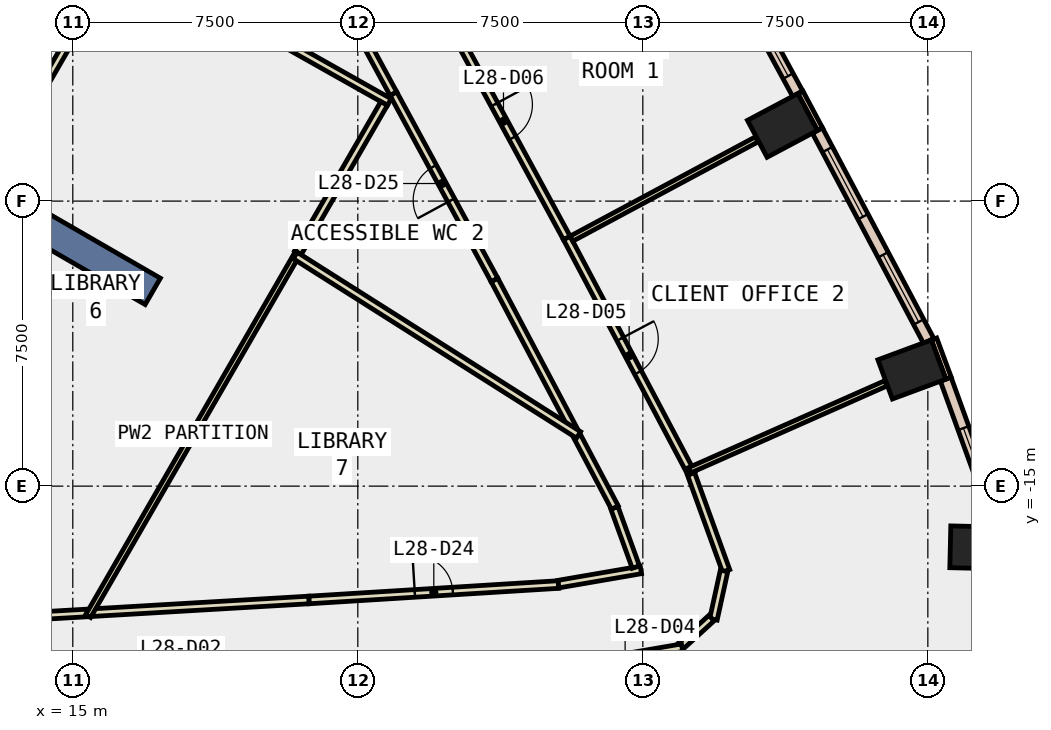
"""IFC4 building model, lengths in metres.
Left out: names, types, materials, properties, quantities, classifications, styles, units other than length and angle.
Written with IfcOpenShell. Run it as: python <this file> out.ifc"""

import sys

from ifc_helpers import new_model, si_unit, direction, frame, frame_2d, origin, origin_2d, place, context, subcontext, project, spatial, rectangle, extrude, element, fill, save


model = new_model("IFC4")
c1 = context("Model", 3, precision=1e-05, world=origin(), true_north=direction((0.0, 1.0)))
c2 = subcontext(c1, "Body", "Model", "MODEL_VIEW")
j1 = project(units=[si_unit("LENGTHUNIT", "METRE"), si_unit("PLANEANGLEUNIT", "RADIAN")], contexts=[c1])
p1 = place(None, origin())
s1 = spatial("IfcSite", under=j1, at=p1, CompositionType="ELEMENT")
p2 = place(p1, origin())
s2 = spatial("IfcBuilding", under=s1, at=p2, CompositionType="ELEMENT")
p3 = place(p2, frame((0.0, 0.0, 128.6)))
s3 = spatial("IfcBuildingStorey", under=s2, at=p3, CompositionType="ELEMENT", Elevation=128.6)
for number, where, z_axis, x_axis in (
    (1, (38.841, -16.614, -0.4), (0.0, 0.0, 1.0), (0.023, 1.0, 0.0)),
    (2, (37.08, -11.931, -0.4), (0.0, 0.0, 1.0), (-0.347, 0.938, 0.0)),
    (3, (33.674, -5.509, -0.4), (0.0, 0.0, 1.0), (-0.469, 0.883, 0.0)),
):
    element("IfcColumn", number, at=place(p3, frame(where, z_axis=z_axis, x_axis=x_axis)), inside=s3, PredefinedType="COLUMN", context=c2, shape_type="SweptSolid", body=[
        extrude(rectangle(XDim=1.1, YDim=1.5, at=origin_2d()), origin(), (0.0, 0.0, 1.0), 4.0),
    ])
p4 = place(p3, frame((9.31, -5.375, -0.4), z_axis=(0.0, 0.0, 1.0), x_axis=(0.866017533419, -0.500013631625, 0.0)))
e4 = element("IfcWall", 4, at=p4, inside=s3, PredefinedType="SHEAR", context=c2, shape_type="SweptSolid", body=[
    extrude(rectangle(XDim=9.0, YDim=0.8, at=frame_2d((4.5, 0.0))), origin(), (0.0, 0.0, 1.0), 4.0),
])
p5 = place(p3, frame((38.045, -12.16, 0.0), z_axis=(0.0, 0.0, 1.0), x_axis=(-0.347010833361, 0.937861120598, 0.0)))
e5 = element("IfcWall", 5, at=p5, inside=s3, PredefinedType="STANDARD", context=c2, shape_type="SweptSolid", body=[
    extrude(rectangle(XDim=1.1, YDim=0.15, at=frame_2d((0.55, 0.0))), origin(), (0.0, 0.0, 1.0), 3.6),
])
p6 = place(p3, frame((34.661, -5.608, 0.0), z_axis=(0.0, 0.0, 1.0), x_axis=(-0.46919310775, 0.883095593716, 0.0)))
e6 = element("IfcWall", 6, at=p6, inside=s3, PredefinedType="STANDARD", context=c2, shape_type="SweptSolid", body=[
    extrude(rectangle(XDim=1.099, YDim=0.15, at=frame_2d((0.55, 0.0))), origin(), (0.0, 0.0, 1.0), 3.6),
])
p7 = place(p3, frame((38.579, -21.236, 0.0), z_axis=(0.0, 0.0, 1.0), x_axis=(0.2139737857, 0.976839402887, 0.0)))
e7 = element("IfcWall", 7, at=p7, inside=s3, PredefinedType="STANDARD", context=c2, shape_type="SweptSolid", body=[
    extrude(rectangle(XDim=4.154, YDim=0.3, at=frame_2d((2.077, 0.0))), origin(), (0.0, 0.0, 1.0), 3.6),
])
p8 = place(p7, frame((1.377, 0.0, 0.9)))
e8 = element("IfcOpeningElement", 8, at=p8, cuts=e7, PredefinedType="OPENING", context=c2, shape_type="SweptSolid", body=[
    extrude(rectangle(XDim=1.4, YDim=2.6, at=frame_2d((0.7, 1.3))), frame((0.0, 0.16, 0.0), z_axis=(0.0, -1.0, 0.0), x_axis=(1.0, 0.0, 0.0)), (0.0, 0.0, 1.0), 0.32),
])
p9 = place(p3, frame((39.379, -16.077, 0.0), z_axis=(0.0, 0.0, 1.0), x_axis=(-0.340477955209, 0.940252499075, 0.0)))
e9 = element("IfcWall", 9, at=p9, inside=s3, PredefinedType="STANDARD", context=c2, shape_type="SweptSolid", body=[
    extrude(rectangle(XDim=4.138, YDim=0.3, at=frame_2d((2.069, 0.0))), origin(), (0.0, 0.0, 1.0), 3.6),
])
p10 = place(p9, frame((1.369, 0.0, 0.9)))
e10 = element("IfcOpeningElement", 10, at=p10, cuts=e9, PredefinedType="OPENING", context=c2, shape_type="SweptSolid", body=[
    extrude(rectangle(XDim=1.4, YDim=2.6, at=frame_2d((0.7, 1.3))), frame((0.0, 0.16, 0.0), z_axis=(0.0, -1.0, 0.0), x_axis=(1.0, 0.0, 0.0)), (0.0, 0.0, 1.0), 0.32),
])
p11 = place(p3, frame((37.523, -11.181, 0.0), z_axis=(0.0, 0.0, 1.0), x_axis=(-0.467654949391, 0.883911108828, 0.0)))
e11 = element("IfcWall", 11, at=p11, inside=s3, PredefinedType="STANDARD", context=c2, shape_type="SweptSolid", body=[
    extrude(rectangle(XDim=6.265, YDim=0.3, at=frame_2d((3.133, 0.0))), origin(), (0.0, 0.0, 1.0), 3.6),
])
p12 = place(p11, frame((0.566, 0.0, 0.9)))
e12 = element("IfcOpeningElement", 12, at=p12, cuts=e11, PredefinedType="OPENING", context=c2, shape_type="SweptSolid", body=[
    extrude(rectangle(XDim=2.0, YDim=2.6, at=frame_2d((1.0, 1.3))), frame((0.0, 0.16, 0.0), z_axis=(0.0, -1.0, 0.0), x_axis=(1.0, 0.0, 0.0)), (0.0, 0.0, 1.0), 0.32),
])
p13 = place(p11, frame((3.699, 0.0, 0.9)))
e13 = element("IfcOpeningElement", 13, at=p13, cuts=e11, PredefinedType="OPENING", context=c2, shape_type="SweptSolid", body=[
    extrude(rectangle(XDim=2.0, YDim=2.6, at=frame_2d((1.0, 1.3))), frame((0.0, 0.16, 0.0), z_axis=(0.0, -1.0, 0.0), x_axis=(1.0, 0.0, 0.0)), (0.0, 0.0, 1.0), 0.32),
])
p14 = place(p3, frame((34.075, -4.675, 0.0), z_axis=(0.0, 0.0, 1.0), x_axis=(-0.476982616152, 0.878912728255, 0.0)))
e14 = element("IfcWall", 14, at=p14, inside=s3, PredefinedType="STANDARD", context=c2, shape_type="SweptSolid", body=[
    extrude(rectangle(XDim=6.115, YDim=0.3, at=frame_2d((3.058, 0.0))), origin(), (0.0, 0.0, 1.0), 3.6),
])
p15 = place(p14, frame((0.529, 0.0, 0.9)))
e15 = element("IfcOpeningElement", 15, at=p15, cuts=e14, PredefinedType="OPENING", context=c2, shape_type="SweptSolid", body=[
    extrude(rectangle(XDim=2.0, YDim=2.6, at=frame_2d((1.0, 1.3))), frame((0.0, 0.16, 0.0), z_axis=(0.0, -1.0, 0.0), x_axis=(1.0, 0.0, 0.0)), (0.0, 0.0, 1.0), 0.32),
])
p16 = place(p14, frame((3.587, 0.0, 0.9)))
e16 = element("IfcOpeningElement", 16, at=p16, cuts=e14, PredefinedType="OPENING", context=c2, shape_type="SweptSolid", body=[
    extrude(rectangle(XDim=2.0, YDim=2.6, at=frame_2d((1.0, 1.3))), frame((0.0, 0.16, 0.0), z_axis=(0.0, -1.0, 0.0), x_axis=(1.0, 0.0, 0.0)), (0.0, 0.0, 1.0), 0.32),
])
p17 = place(p3, frame((14.288, -18.4, 0.0), z_axis=(0.0, 0.0, 1.0), x_axis=(0.998339941676, 0.057596535097, 0.0)))
e17 = element("IfcWall", 17, at=p17, inside=s3, PredefinedType="PARTITIONING", context=c2, shape_type="SweptSolid", body=[
    extrude(rectangle(XDim=1.094, YDim=0.2, at=frame_2d((0.547, 0.0))), origin(), (0.0, 0.0, 1.0), 3.6),
])
p18 = place(p3, frame((23.437, -4.676, 0.0), z_axis=(0.0, 0.0, 1.0), x_axis=(-0.47686467088, 0.878976726465, 0.0)))
e18 = element("IfcWall", 18, at=p18, inside=s3, PredefinedType="PARTITIONING", context=c2, shape_type="SweptSolid", body=[
    extrude(rectangle(XDim=1.542, YDim=0.2, at=frame_2d((0.771, 0.0))), origin(), (0.0, 0.0, 1.0), 3.6),
])
p19 = place(p3, frame((15.529, -18.328, 0.0), z_axis=(0.0, 0.0, 1.0), x_axis=(0.998293671523, 0.058393025246, 0.0)))
e19 = element("IfcWall", 19, at=p19, inside=s3, PredefinedType="PARTITIONING", context=c2, shape_type="SweptSolid", body=[
    extrude(rectangle(XDim=5.699, YDim=0.2, at=frame_2d((2.849, 0.0))), origin(), (0.0, 0.0, 1.0), 3.6),
])
p20 = place(p3, frame((21.218, -17.995, 0.0), z_axis=(0.0, 0.0, 1.0), x_axis=(0.998092528214, 0.061735768594, 0.0)))
e20 = element("IfcWall", 20, at=p20, inside=s3, PredefinedType="PARTITIONING", context=c2, shape_type="SweptSolid", body=[
    extrude(rectangle(XDim=6.576, YDim=0.2, at=frame_2d((3.288, 0.0))), origin(), (0.0, 0.0, 1.0), 3.6),
])
p21 = place(p20, frame((2.788, 0.0, 0.0)))
e21 = element("IfcOpeningElement", 21, at=p21, cuts=e20, PredefinedType="OPENING", context=c2, shape_type="SweptSolid", body=[
    extrude(rectangle(XDim=1.0, YDim=2.1, at=frame_2d((0.5, 1.05))), frame((0.0, 0.11, 0.0), z_axis=(0.0, -1.0, 0.0), x_axis=(1.0, 0.0, 0.0)), (0.0, 0.0, 1.0), 0.22),
])
p22 = place(p3, frame((27.78, -17.578, 0.0), z_axis=(0.0, 0.0, 1.0), x_axis=(0.985534991456, 0.169472064409, 0.0)))
e22 = element("IfcWall", 22, at=p22, inside=s3, PredefinedType="PARTITIONING", context=c2, shape_type="SweptSolid", body=[
    extrude(rectangle(XDim=2.2, YDim=0.2, at=frame_2d((1.1, 0.0))), origin(), (0.0, 0.0, 1.0), 3.6),
])
p23 = place(p3, frame((29.816, -17.128, 0.0), z_axis=(0.0, 0.0, 1.0), x_axis=(-0.340726116699, 0.940162599447, 0.0)))
e23 = element("IfcWall", 23, at=p23, inside=s3, PredefinedType="PARTITIONING", context=c2, shape_type="SweptSolid", body=[
    extrude(rectangle(XDim=1.658, YDim=0.2, at=frame_2d((0.829, 0.0))), origin(), (0.0, 0.0, 1.0), 3.6),
])
p24 = place(p3, frame((29.264, -15.564, 0.0), z_axis=(0.0, 0.0, 1.0), x_axis=(-0.46760771465, 0.883936097917, 0.0)))
e24 = element("IfcWall", 24, at=p24, inside=s3, PredefinedType="PARTITIONING", context=c2, shape_type="SweptSolid", body=[
    extrude(rectangle(XDim=2.123, YDim=0.2, at=frame_2d((1.062, 0.0))), origin(), (0.0, 0.0, 1.0), 3.6),
])
p25 = place(p3, frame((28.177, -13.51, 0.0), z_axis=(0.0, 0.0, 1.0), x_axis=(-0.467580354248, 0.883950571198, 0.0)))
e25 = element("IfcWall", 25, at=p25, inside=s3, PredefinedType="PARTITIONING", context=c2, shape_type="SweptSolid", body=[
    extrude(rectangle(XDim=4.453, YDim=0.2, at=frame_2d((2.227, 0.0))), origin(), (0.0, 0.0, 1.0), 3.6),
])
p26 = place(p3, frame((26.095, -9.574, 0.0), z_axis=(0.0, 0.0, 1.0), x_axis=(-0.476963271937, 0.878923226012, 0.0)))
e26 = element("IfcWall", 26, at=p26, inside=s3, PredefinedType="PARTITIONING", context=c2, shape_type="SweptSolid", body=[
    extrude(rectangle(XDim=5.573, YDim=0.2, at=frame_2d((2.786, 0.0))), origin(), (0.0, 0.0, 1.0), 3.6),
])
p27 = place(p26, frame((2.386, 0.0, 0.0)))
e27 = element("IfcOpeningElement", 27, at=p27, cuts=e26, PredefinedType="OPENING", context=c2, shape_type="SweptSolid", body=[
    extrude(rectangle(XDim=1.0, YDim=2.1, at=frame_2d((0.5, 1.05))), frame((0.0, 0.11, 0.0), z_axis=(0.0, -1.0, 0.0), x_axis=(1.0, 0.0, 0.0)), (0.0, 0.0, 1.0), 0.22),
])
p28 = place(p3, frame((31.268, -14.676, 0.0), z_axis=(0.0, 0.0, 1.0), x_axis=(0.340269739222, -0.940327870782, 0.0)))
e28 = element("IfcWall", 28, at=p28, inside=s3, PredefinedType="PARTITIONING", context=c2, shape_type="SweptSolid", body=[
    extrude(rectangle(XDim=2.715, YDim=0.2, at=frame_2d((1.357, 0.0))), origin(), (0.0, 0.0, 1.0), 3.6),
])
p29 = place(p3, frame((32.137, -17.232, 0.0), z_axis=(0.0, 0.0, 1.0), x_axis=(-0.214289506547, -0.976770191695, 0.0)))
e29 = element("IfcWall", 29, at=p29, inside=s3, PredefinedType="PARTITIONING", context=c2, shape_type="SweptSolid", body=[
    extrude(rectangle(XDim=1.302, YDim=0.2, at=frame_2d((0.651, 0.0))), origin(), (0.0, 0.0, 1.0), 3.6),
])
p30 = place(p3, frame((31.806, -18.473, 0.0), z_axis=(0.0, 0.0, 1.0), x_axis=(-0.739141286173, -0.673550413165, 0.0)))
e30 = element("IfcWall", 30, at=p30, inside=s3, PredefinedType="PARTITIONING", context=c2, shape_type="SweptSolid", body=[
    extrude(rectangle(XDim=1.079, YDim=0.2, at=frame_2d((0.54, 0.0))), origin(), (0.0, 0.0, 1.0), 3.6),
])
p31 = place(p3, frame((31.033, -19.251, 0.0), z_axis=(0.0, 0.0, 1.0), x_axis=(-0.985494394638, -0.169707979005, 0.0)))
e31 = element("IfcWall", 31, at=p31, inside=s3, PredefinedType="PARTITIONING", context=c2, shape_type="SweptSolid", body=[
    extrude(rectangle(XDim=3.041, YDim=0.2, at=frame_2d((1.521, 0.0))), origin(), (0.0, 0.0, 1.0), 3.6),
])
p32 = place(p31, frame((1.021, 0.0, 0.0)))
e32 = element("IfcOpeningElement", 32, at=p32, cuts=e31, PredefinedType="OPENING", context=c2, shape_type="SweptSolid", body=[
    extrude(rectangle(XDim=1.0, YDim=2.1, at=frame_2d((0.5, 1.05))), frame((0.0, 0.11, 0.0), z_axis=(0.0, -1.0, 0.0), x_axis=(1.0, 0.0, 0.0)), (0.0, 0.0, 1.0), 0.22),
])
p33 = place(p3, frame((27.999, -8.469, 0.0), z_axis=(0.0, 0.0, 1.0), x_axis=(0.467683043694, -0.883896244274, 0.0)))
e33 = element("IfcWall", 33, at=p33, inside=s3, PredefinedType="PARTITIONING", context=c2, shape_type="SweptSolid", body=[
    extrude(rectangle(XDim=7.015, YDim=0.2, at=frame_2d((3.508, 0.0))), origin(), (0.0, 0.0, 1.0), 3.6),
])
p34 = place(p33, frame((3.008, 0.0, 0.0)))
e34 = element("IfcOpeningElement", 34, at=p34, cuts=e33, PredefinedType="OPENING", context=c2, shape_type="SweptSolid", body=[
    extrude(rectangle(XDim=1.0, YDim=2.1, at=frame_2d((0.5, 1.05))), frame((0.0, 0.11, 0.0), z_axis=(0.0, -1.0, 0.0), x_axis=(1.0, 0.0, 0.0)), (0.0, 0.0, 1.0), 0.22),
])
p35 = place(p3, frame((24.595, -2.196, 0.0), z_axis=(0.0, 0.0, 1.0), x_axis=(0.47695522124, -0.878927594818, 0.0)))
e35 = element("IfcWall", 35, at=p35, inside=s3, PredefinedType="PARTITIONING", context=c2, shape_type="SweptSolid", body=[
    extrude(rectangle(XDim=7.137, YDim=0.2, at=frame_2d((3.568, 0.0))), origin(), (0.0, 0.0, 1.0), 3.6),
])
p36 = place(p35, frame((3.144, 0.0, 0.0)))
e36 = element("IfcOpeningElement", 36, at=p36, cuts=e35, PredefinedType="OPENING", context=c2, shape_type="SweptSolid", body=[
    extrude(rectangle(XDim=1.0, YDim=2.1, at=frame_2d((0.5, 1.05))), frame((0.0, 0.11, 0.0), z_axis=(0.0, -1.0, 0.0), x_axis=(1.0, 0.0, 0.0)), (0.0, 0.0, 1.0), 0.22),
])
p37 = place(p3, frame((16.32, -0.832, 0.0), z_axis=(0.0, 0.0, 1.0), x_axis=(-0.499951642806, -0.866053321023, 0.0)))
e37 = element("IfcWall", 37, at=p37, inside=s3, PredefinedType="PARTITIONING", context=c2, shape_type="SweptSolid", body=[
    extrude(rectangle(XDim=7.039, YDim=0.2, at=frame_2d((3.52, 0.0))), origin(), (0.0, 0.0, 1.0), 3.6),
])
p38 = place(p3, frame((16.27, -0.919, 0.0), z_axis=(0.0, 0.0, 1.0), x_axis=(0.871308980511, -0.490734816863, 0.0)))
e38 = element("IfcWall", 38, at=p38, inside=s3, PredefinedType="PARTITIONING", context=c2, shape_type="SweptSolid", body=[
    extrude(rectangle(XDim=8.1, YDim=0.2, at=frame_2d((4.05, 0.0))), origin(), (0.0, 0.0, 1.0), 3.6),
])
p39 = place(p3, frame((20.924, -8.858, 0.0), z_axis=(0.0, 0.0, 1.0), x_axis=(-0.499996828157, -0.866027235041, 0.0)))
e39 = element("IfcWall", 39, at=p39, inside=s3, PredefinedType="PARTITIONING", context=c2, shape_type="SweptSolid", body=[
    extrude(rectangle(XDim=11.04, YDim=0.15, at=frame_2d((5.52, 0.0))), origin(), (0.0, 0.0, 1.0), 3.6),
])
p40 = place(p3, frame((23.191, -4.932, 0.0), z_axis=(0.0, 0.0, 1.0), x_axis=(-0.500025458316, -0.86601070492, 0.0)))
e40 = element("IfcWall", 40, at=p40, inside=s3, PredefinedType="PARTITIONING", context=c2, shape_type="SweptSolid", body=[
    extrude(rectangle(XDim=4.533, YDim=0.2, at=frame_2d((2.267, 0.0))), origin(), (0.0, 0.0, 1.0), 3.6),
])
p41 = place(p3, frame((20.853, -8.931, 0.0), z_axis=(0.0, 0.0, 1.0), x_axis=(0.844869091455, -0.534973100542, 0.0)))
e41 = element("IfcWall", 41, at=p41, inside=s3, PredefinedType="PARTITIONING", context=c2, shape_type="SweptSolid", body=[
    extrude(rectangle(XDim=8.825, YDim=0.2, at=frame_2d((4.413, 0.0))), origin(), (0.0, 0.0, 1.0), 3.6),
])
p42 = place(p3, frame((31.233, -14.582, 0.0), z_axis=(0.0, 0.0, 1.0), x_axis=(0.914317360249, 0.404998474994, 0.0)))
e42 = element("IfcWall", 42, at=p42, inside=s3, PredefinedType="PARTITIONING", context=c2, shape_type="SweptSolid", body=[
    extrude(rectangle(XDim=5.645, YDim=0.15, at=frame_2d((2.822, 0.0))), origin(), (0.0, 0.0, 1.0), 3.6),
])
p43 = place(p3, frame((28.123, -8.488, 0.0), z_axis=(0.0, 0.0, 1.0), x_axis=(0.881406449288, 0.472358625573, 0.0)))
e43 = element("IfcWall", 43, at=p43, inside=s3, PredefinedType="PARTITIONING", context=c2, shape_type="SweptSolid", body=[
    extrude(rectangle(XDim=5.53, YDim=0.15, at=frame_2d((2.765, 0.0))), origin(), (0.0, 0.0, 1.0), 3.6),
])
p44 = place(p10, origin())
e44 = element("IfcWindow", 44, at=p44, inside=s3, PartitioningType="SINGLE_PANEL", PredefinedType="WINDOW", context=c2, shape_type="SweptSolid", body=[
    extrude(rectangle(XDim=1.4, YDim=2.6, at=frame_2d((0.7, 1.3))), frame((0.0, 0.03, 0.0), z_axis=(0.0, -1.0, 0.0), x_axis=(1.0, 0.0, 0.0)), (0.0, 0.0, 1.0), 0.06),
])
fill(e10, e44)
p45 = place(p12, origin())
e45 = element("IfcWindow", 45, at=p45, inside=s3, PartitioningType="SINGLE_PANEL", PredefinedType="WINDOW", context=c2, shape_type="SweptSolid", body=[
    extrude(rectangle(XDim=2.0, YDim=2.6, at=frame_2d((1.0, 1.3))), frame((0.0, 0.03, 0.0), z_axis=(0.0, -1.0, 0.0), x_axis=(1.0, 0.0, 0.0)), (0.0, 0.0, 1.0), 0.06),
])
fill(e12, e45)
p46 = place(p13, origin())
e46 = element("IfcWindow", 46, at=p46, inside=s3, PartitioningType="SINGLE_PANEL", PredefinedType="WINDOW", context=c2, shape_type="SweptSolid", body=[
    extrude(rectangle(XDim=2.0, YDim=2.6, at=frame_2d((1.0, 1.3))), frame((0.0, 0.03, 0.0), z_axis=(0.0, -1.0, 0.0), x_axis=(1.0, 0.0, 0.0)), (0.0, 0.0, 1.0), 0.06),
])
fill(e13, e46)
p47 = place(p15, origin())
e47 = element("IfcWindow", 47, at=p47, inside=s3, PartitioningType="SINGLE_PANEL", PredefinedType="WINDOW", context=c2, shape_type="SweptSolid", body=[
    extrude(rectangle(XDim=2.0, YDim=2.6, at=frame_2d((1.0, 1.3))), frame((0.0, 0.03, 0.0), z_axis=(0.0, -1.0, 0.0), x_axis=(1.0, 0.0, 0.0)), (0.0, 0.0, 1.0), 0.06),
])
fill(e15, e47)
p48 = place(p34, origin())
e48 = element("IfcDoor", 48, at=p48, inside=s3, OperationType="SINGLE_SWING_LEFT", PredefinedType="DOOR", context=c2, shape_type="SweptSolid", body=[
    extrude(rectangle(XDim=1.0, YDim=2.1, at=frame_2d((0.5, 1.05))), frame((0.0, 0.025, 0.0), z_axis=(0.0, -1.0, 0.0), x_axis=(1.0, 0.0, 0.0)), (0.0, 0.0, 1.0), 0.05),
])
fill(e34, e48)
p49 = place(p36, origin())
e49 = element("IfcDoor", 49, at=p49, inside=s3, OperationType="SINGLE_SWING_LEFT", PredefinedType="DOOR", context=c2, shape_type="SweptSolid", body=[
    extrude(rectangle(XDim=1.0, YDim=2.1, at=frame_2d((0.5, 1.05))), frame((0.0, 0.025, 0.0), z_axis=(0.0, -1.0, 0.0), x_axis=(1.0, 0.0, 0.0)), (0.0, 0.0, 1.0), 0.05),
])
fill(e36, e49)
p50 = place(p21, origin())
e50 = element("IfcDoor", 50, at=p50, inside=s3, OperationType="SINGLE_SWING_LEFT", PredefinedType="DOOR", context=c2, shape_type="SweptSolid", body=[
    extrude(rectangle(XDim=1.0, YDim=2.1, at=frame_2d((0.5, 1.05))), frame((0.0, 0.025, 0.0), z_axis=(0.0, -1.0, 0.0), x_axis=(1.0, 0.0, 0.0)), (0.0, 0.0, 1.0), 0.05),
])
fill(e21, e50)
p51 = place(p27, origin())
e51 = element("IfcDoor", 51, at=p51, inside=s3, OperationType="SINGLE_SWING_LEFT", PredefinedType="DOOR", context=c2, shape_type="SweptSolid", body=[
    extrude(rectangle(XDim=1.0, YDim=2.1, at=frame_2d((0.5, 1.05))), frame((0.0, 0.025, 0.0), z_axis=(0.0, -1.0, 0.0), x_axis=(1.0, 0.0, 0.0)), (0.0, 0.0, 1.0), 0.05),
])
fill(e27, e51)
save(model, sys.argv[1])
